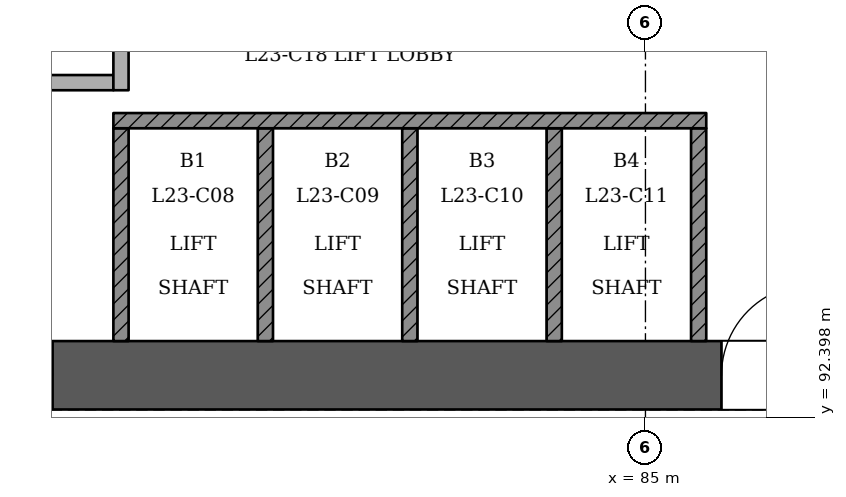
"""IFC4 building model, lengths in metres.
Left out: names, types, materials, properties, quantities, classifications, styles, units other than length and angle.
Written with IfcOpenShell. Run it as: python <this file> out.ifc"""

import sys

from ifc_helpers import new_model, si_unit, direction, frame, frame_2d, origin, place, context, subcontext, project, spatial, rectangle, extrude, element, fill, save


model = new_model("IFC4")
c1 = context("Model", 3, precision=1e-05, world=origin(), true_north=direction((0.0, 1.0)))
c2 = subcontext(c1, "Body", "Model", "MODEL_VIEW")
j1 = project(units=[si_unit("LENGTHUNIT", "METRE"), si_unit("PLANEANGLEUNIT", "RADIAN")], contexts=[c1])
p1 = place(None, origin())
s1 = spatial("IfcSite", under=j1, at=p1, CompositionType="ELEMENT")
p2 = place(p1, origin())
s2 = spatial("IfcBuilding", under=s1, at=p2, CompositionType="ELEMENT")
p3 = place(p2, frame((0.0, 0.0, 91.8)))
s3 = spatial("IfcBuildingStorey", under=s2, at=p3, CompositionType="ELEMENT", Elevation=91.8)
p4 = place(p3, frame((72.55, 92.95, 0.0), z_axis=(0.0, 0.0, 1.0), x_axis=(1.0, 0.0, 0.0)))
e1 = element("IfcWall", 1, at=p4, inside=s3, PredefinedType="SHEAR", context=c2, shape_type="SweptSolid", body=[
    extrude(rectangle(XDim=25.35, YDim=0.9, at=frame_2d((12.675, 0.0))), origin(), (0.0, 0.0, 1.0), 3.6),
])
p5 = place(p4, frame((1.25, 0.0, 0.0)))
e2 = element("IfcOpeningElement", 2, at=p5, cuts=e1, PredefinedType="OPENING", context=c2, shape_type="SweptSolid", body=[
    extrude(rectangle(XDim=1.2, YDim=2.1, at=frame_2d((0.6, 1.05))), frame((0.0, 0.46, 0.0), z_axis=(0.0, -1.0, 0.0), x_axis=(1.0, 0.0, 0.0)), (0.0, 0.0, 1.0), 0.921),
])
p6 = place(p4, frame((3.45, 0.0, 0.0)))
e3 = element("IfcOpeningElement", 3, at=p6, cuts=e1, PredefinedType="OPENING", context=c2, shape_type="SweptSolid", body=[
    extrude(rectangle(XDim=1.2, YDim=2.1, at=frame_2d((0.6, 1.05))), frame((0.0, 0.46, 0.0), z_axis=(0.0, -1.0, 0.0), x_axis=(1.0, 0.0, 0.0)), (0.0, 0.0, 1.0), 0.921),
])
p7 = place(p4, frame((13.45, 0.0, 0.0)))
e4 = element("IfcOpeningElement", 4, at=p7, cuts=e1, PredefinedType="OPENING", context=c2, shape_type="SweptSolid", body=[
    extrude(rectangle(XDim=1.2, YDim=2.1, at=frame_2d((0.6, 1.05))), frame((0.0, 0.46, 0.0), z_axis=(0.0, -1.0, 0.0), x_axis=(1.0, 0.0, 0.0)), (0.0, 0.0, 1.0), 0.921),
])
p8 = place(p4, frame((15.712, 0.0, 0.0)))
e5 = element("IfcOpeningElement", 5, at=p8, cuts=e1, PredefinedType="OPENING", context=c2, shape_type="SweptSolid", body=[
    extrude(rectangle(XDim=1.0, YDim=2.1, at=frame_2d((0.5, 1.05))), frame((0.0, 0.46, 0.0), z_axis=(0.0, -1.0, 0.0), x_axis=(1.0, 0.0, 0.0)), (0.0, 0.0, 1.0), 0.921),
])
p9 = place(p4, frame((18.35, 0.0, 0.0)))
e6 = element("IfcOpeningElement", 6, at=p9, cuts=e1, PredefinedType="OPENING", context=c2, shape_type="SweptSolid", body=[
    extrude(rectangle(XDim=1.0, YDim=2.1, at=frame_2d((0.5, 1.05))), frame((0.0, 0.46, 0.0), z_axis=(0.0, -1.0, 0.0), x_axis=(1.0, 0.0, 0.0)), (0.0, 0.0, 1.0), 0.921),
])
p10 = place(p4, frame((21.938, 0.0, 0.0)))
e7 = element("IfcOpeningElement", 7, at=p10, cuts=e1, PredefinedType="OPENING", context=c2, shape_type="SweptSolid", body=[
    extrude(rectangle(XDim=1.0, YDim=2.1, at=frame_2d((0.5, 1.05))), frame((0.0, 0.46, 0.0), z_axis=(0.0, -1.0, 0.0), x_axis=(1.0, 0.0, 0.0)), (0.0, 0.0, 1.0), 0.921),
])
p11 = place(p3, frame((63.319, 97.54, 0.0), z_axis=(0.0, 0.0, 1.0), x_axis=(0.500001382442, -0.86602460563, 0.0)))
e8 = element("IfcWall", 8, at=p11, inside=s3, PredefinedType="PARTITIONING", context=c2, shape_type="SweptSolid", body=[
    extrude(rectangle(XDim=42.252, YDim=0.15, at=frame_2d((21.126, 0.0))), origin(), (0.0, 0.0, 1.0), 2.9),
])
p12 = place(p11, frame((3.076, 0.0, 0.0)))
e9 = element("IfcOpeningElement", 9, at=p12, cuts=e8, PredefinedType="OPENING", context=c2, shape_type="SweptSolid", body=[
    extrude(rectangle(XDim=1.2, YDim=2.1, at=frame_2d((0.6, 1.05))), frame((0.0, 0.085, 0.0), z_axis=(0.0, -1.0, 0.0), x_axis=(1.0, 0.0, 0.0)), (0.0, 0.0, 1.0), 0.171),
])
p13 = place(p11, frame((10.455, 0.0, 0.0)))
e10 = element("IfcOpeningElement", 10, at=p13, cuts=e8, PredefinedType="OPENING", context=c2, shape_type="SweptSolid", body=[
    extrude(rectangle(XDim=1.1, YDim=2.1, at=frame_2d((0.55, 1.05))), frame((0.0, 0.085, 0.0), z_axis=(0.0, -1.0, 0.0), x_axis=(1.0, 0.0, 0.0)), (0.0, 0.0, 1.0), 0.171),
])
p14 = place(p11, frame((13.876, 0.0, 0.0)))
e11 = element("IfcOpeningElement", 11, at=p14, cuts=e8, PredefinedType="OPENING", context=c2, shape_type="SweptSolid", body=[
    extrude(rectangle(XDim=1.0, YDim=2.1, at=frame_2d((0.5, 1.05))), frame((0.0, 0.085, 0.0), z_axis=(0.0, -1.0, 0.0), x_axis=(1.0, 0.0, 0.0)), (0.0, 0.0, 1.0), 0.171),
])
p15 = place(p11, frame((18.376, 0.0, 0.0)))
e12 = element("IfcOpeningElement", 12, at=p15, cuts=e8, PredefinedType="OPENING", context=c2, shape_type="SweptSolid", body=[
    extrude(rectangle(XDim=1.0, YDim=2.1, at=frame_2d((0.5, 1.05))), frame((0.0, 0.085, 0.0), z_axis=(0.0, -1.0, 0.0), x_axis=(1.0, 0.0, 0.0)), (0.0, 0.0, 1.0), 0.171),
])
p16 = place(p11, frame((21.731, 0.0, 0.0)))
e13 = element("IfcOpeningElement", 13, at=p16, cuts=e8, PredefinedType="OPENING", context=c2, shape_type="SweptSolid", body=[
    extrude(rectangle(XDim=1.0, YDim=2.1, at=frame_2d((0.5, 1.05))), frame((0.0, 0.085, 0.0), z_axis=(0.0, -1.0, 0.0), x_axis=(1.0, 0.0, 0.0)), (0.0, 0.0, 1.0), 0.171),
])
p17 = place(p11, frame((28.406, 0.0, 0.0)))
e14 = element("IfcOpeningElement", 14, at=p17, cuts=e8, PredefinedType="OPENING", context=c2, shape_type="SweptSolid", body=[
    extrude(rectangle(XDim=1.0, YDim=2.1, at=frame_2d((0.5, 1.05))), frame((0.0, 0.085, 0.0), z_axis=(0.0, -1.0, 0.0), x_axis=(1.0, 0.0, 0.0)), (0.0, 0.0, 1.0), 0.171),
])
p18 = place(p11, frame((30.847, 0.0, 0.0)))
e15 = element("IfcOpeningElement", 15, at=p18, cuts=e8, PredefinedType="OPENING", context=c2, shape_type="SweptSolid", body=[
    extrude(rectangle(XDim=1.0, YDim=2.1, at=frame_2d((0.5, 1.05))), frame((0.0, 0.085, 0.0), z_axis=(0.0, -1.0, 0.0), x_axis=(1.0, 0.0, 0.0)), (0.0, 0.0, 1.0), 0.171),
])
p19 = place(p11, frame((37.989, 0.0, 0.0)))
e16 = element("IfcOpeningElement", 16, at=p19, cuts=e8, PredefinedType="OPENING", context=c2, shape_type="SweptSolid", body=[
    extrude(rectangle(XDim=1.2, YDim=2.1, at=frame_2d((0.6, 1.05))), frame((0.0, 0.085, 0.0), z_axis=(0.0, -1.0, 0.0), x_axis=(1.0, 0.0, 0.0)), (0.0, 0.0, 1.0), 0.171),
])
p20 = place(p3, frame((85.554, 60.948, 0.0), z_axis=(0.0, 0.0, 1.0), x_axis=(0.500001382442, 0.86602460563, 0.0)))
e17 = element("IfcWall", 17, at=p20, inside=s3, PredefinedType="PARTITIONING", context=c2, shape_type="SweptSolid", body=[
    extrude(rectangle(XDim=42.252, YDim=0.15, at=frame_2d((21.126, 0.0))), origin(), (0.0, 0.0, 1.0), 2.9),
])
p21 = place(p20, frame((0.285, 0.0, 0.0)))
e18 = element("IfcOpeningElement", 18, at=p21, cuts=e17, PredefinedType="OPENING", context=c2, shape_type="SweptSolid", body=[
    extrude(rectangle(XDim=1.2, YDim=2.1, at=frame_2d((0.6, 1.05))), frame((0.0, 0.085, 0.0), z_axis=(0.0, -1.0, 0.0), x_axis=(1.0, 0.0, 0.0)), (0.0, 0.0, 1.0), 0.171),
])
p22 = place(p20, frame((3.731, 0.0, 0.0)))
e19 = element("IfcOpeningElement", 19, at=p22, cuts=e17, PredefinedType="OPENING", context=c2, shape_type="SweptSolid", body=[
    extrude(rectangle(XDim=1.0, YDim=2.1, at=frame_2d((0.5, 1.05))), frame((0.0, 0.085, 0.0), z_axis=(0.0, -1.0, 0.0), x_axis=(1.0, 0.0, 0.0)), (0.0, 0.0, 1.0), 0.171),
])
p23 = place(p20, frame((11.526, 0.0, 0.0)))
e20 = element("IfcOpeningElement", 20, at=p23, cuts=e17, PredefinedType="OPENING", context=c2, shape_type="SweptSolid", body=[
    extrude(rectangle(XDim=1.2, YDim=2.1, at=frame_2d((0.6, 1.05))), frame((0.0, 0.085, 0.0), z_axis=(0.0, -1.0, 0.0), x_axis=(1.0, 0.0, 0.0)), (0.0, 0.0, 1.0), 0.171),
])
p24 = place(p20, frame((18.376, 0.0, 0.0)))
e21 = element("IfcOpeningElement", 21, at=p24, cuts=e17, PredefinedType="OPENING", context=c2, shape_type="SweptSolid", body=[
    extrude(rectangle(XDim=1.0, YDim=2.1, at=frame_2d((0.5, 1.05))), frame((0.0, 0.085, 0.0), z_axis=(0.0, -1.0, 0.0), x_axis=(1.0, 0.0, 0.0)), (0.0, 0.0, 1.0), 0.171),
])
p25 = place(p20, frame((21.731, 0.0, 0.0)))
e22 = element("IfcOpeningElement", 22, at=p25, cuts=e17, PredefinedType="OPENING", context=c2, shape_type="SweptSolid", body=[
    extrude(rectangle(XDim=1.0, YDim=2.1, at=frame_2d((0.5, 1.05))), frame((0.0, 0.085, 0.0), z_axis=(0.0, -1.0, 0.0), x_axis=(1.0, 0.0, 0.0)), (0.0, 0.0, 1.0), 0.171),
])
p26 = place(p20, frame((27.376, 0.0, 0.0)))
e23 = element("IfcOpeningElement", 23, at=p26, cuts=e17, PredefinedType="OPENING", context=c2, shape_type="SweptSolid", body=[
    extrude(rectangle(XDim=1.0, YDim=2.1, at=frame_2d((0.5, 1.05))), frame((0.0, 0.085, 0.0), z_axis=(0.0, -1.0, 0.0), x_axis=(1.0, 0.0, 0.0)), (0.0, 0.0, 1.0), 0.171),
])
p27 = place(p20, frame((30.697, 0.0, 0.0)))
e24 = element("IfcOpeningElement", 24, at=p27, cuts=e17, PredefinedType="OPENING", context=c2, shape_type="SweptSolid", body=[
    extrude(rectangle(XDim=1.1, YDim=2.1, at=frame_2d((0.55, 1.05))), frame((0.0, 0.085, 0.0), z_axis=(0.0, -1.0, 0.0), x_axis=(1.0, 0.0, 0.0)), (0.0, 0.0, 1.0), 0.171),
])
p28 = place(p20, frame((37.976, 0.0, 0.0)))
e25 = element("IfcOpeningElement", 25, at=p28, cuts=e17, PredefinedType="OPENING", context=c2, shape_type="SweptSolid", body=[
    extrude(rectangle(XDim=1.2, YDim=2.1, at=frame_2d((0.6, 1.05))), frame((0.0, 0.085, 0.0), z_axis=(0.0, -1.0, 0.0), x_axis=(1.0, 0.0, 0.0)), (0.0, 0.0, 1.0), 0.171),
])
for number, where, z_axis, x_axis in (
    (26, (78.1, 93.4, 0.0), (0.0, 0.0, 1.0), (0.0, 1.0, 0.0)),
    (27, (80.0, 93.4, 0.0), (0.0, 0.0, 1.0), (0.0, 1.0, 0.0)),
    (28, (81.9, 93.4, 0.0), (0.0, 0.0, 1.0), (0.0, 1.0, 0.0)),
    (29, (83.8, 93.4, 0.0), (0.0, 0.0, 1.0), (0.0, 1.0, 0.0)),
    (30, (85.7, 93.4, 0.0), (0.0, 0.0, 1.0), (0.0, 1.0, 0.0)),
):
    element("IfcWall", number, at=place(p3, frame(where, z_axis=z_axis, x_axis=x_axis)), inside=s3, PredefinedType="SOLIDWALL", context=c2, shape_type="SweptSolid", body=[
        extrude(rectangle(XDim=2.8, YDim=0.2, at=frame_2d((1.4, 0.0))), origin(), (0.0, 0.0, 1.0), 3.3),
    ])
p29 = place(p3, frame((78.0, 96.3, 0.0), z_axis=(0.0, 0.0, 1.0), x_axis=(1.0, 0.0, 0.0)))
e31 = element("IfcWall", 31, at=p29, inside=s3, PredefinedType="SOLIDWALL", context=c2, shape_type="SweptSolid", body=[
    extrude(rectangle(XDim=7.8, YDim=0.2, at=frame_2d((3.9, 0.0))), origin(), (0.0, 0.0, 1.0), 3.3),
])
p30 = place(p3, frame((76.1, 96.8, 0.0), z_axis=(0.0, 0.0, 1.0), x_axis=(1.0, 0.0, 0.0)))
e32 = element("IfcWall", 32, at=p30, inside=s3, PredefinedType="PARTITIONING", context=c2, shape_type="SweptSolid", body=[
    extrude(rectangle(XDim=1.9, YDim=0.2, at=frame_2d((0.95, 0.0))), origin(), (0.0, 0.0, 1.0), 3.3),
])
p31 = place(p3, frame((78.1, 96.7, 0.0), z_axis=(0.0, 0.0, 1.0), x_axis=(0.0, 1.0, 0.0)))
e33 = element("IfcWall", 33, at=p31, inside=s3, PredefinedType="PARTITIONING", context=c2, shape_type="SweptSolid", body=[
    extrude(rectangle(XDim=3.7, YDim=0.2, at=frame_2d((1.85, 0.0))), origin(), (0.0, 0.0, 1.0), 3.3),
])
p32 = place(p31, frame((1.95, 0.0, 0.0)))
e34 = element("IfcOpeningElement", 34, at=p32, cuts=e33, PredefinedType="OPENING", context=c2, shape_type="SweptSolid", body=[
    extrude(rectangle(XDim=1.1, YDim=2.1, at=frame_2d((0.55, 1.05))), frame((0.0, 0.11, 0.0), z_axis=(0.0, -1.0, 0.0), x_axis=(1.0, 0.0, 0.0)), (0.0, 0.0, 1.0), 0.221),
])
p33 = place(p6, origin())
e35 = element("IfcDoor", 35, at=p33, inside=s3, OperationType="SINGLE_SWING_LEFT", PredefinedType="NOTDEFINED", context=c2, shape_type="SweptSolid", body=[
    extrude(rectangle(XDim=1.2, YDim=2.1, at=frame_2d((0.6, 1.05))), frame((0.0, 0.025, 0.0), z_axis=(0.0, -1.0, 0.0), x_axis=(1.0, 0.0, 0.0)), (0.0, 0.0, 1.0), 0.05),
])
fill(e3, e35)
p34 = place(p7, origin())
e36 = element("IfcDoor", 36, at=p34, inside=s3, OperationType="SINGLE_SWING_RIGHT", PredefinedType="NOTDEFINED", context=c2, shape_type="SweptSolid", body=[
    extrude(rectangle(XDim=1.2, YDim=2.1, at=frame_2d((0.6, 1.05))), frame((0.0, 0.025, 0.0), z_axis=(0.0, -1.0, 0.0), x_axis=(1.0, 0.0, 0.0)), (0.0, 0.0, 1.0), 0.05),
])
fill(e4, e36)
save(model, sys.argv[1])
